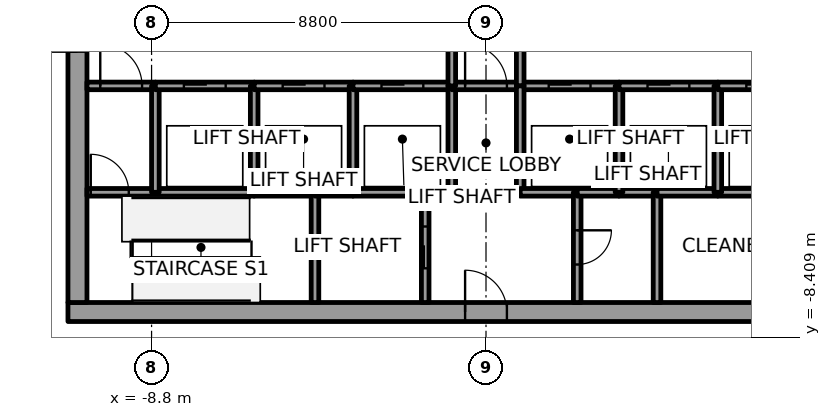
"""IFC4 building model, lengths in metres.
Left out: names, types, materials, properties, quantities, classifications, styles, units other than length and angle.
Written with IfcOpenShell. Run it as: python <this file> out.ifc"""

import sys

from ifc_helpers import new_model, si_unit, direction, frame, frame_2d, origin, place, context, subcontext, project, spatial, rectangle, extrude, element, fill, save


model = new_model("IFC4")
c1 = context("Model", 3, precision=1e-05, world=origin(), true_north=direction((0.0, 1.0)))
c2 = subcontext(c1, "Body", "Model", "MODEL_VIEW")
j1 = project(units=[si_unit("LENGTHUNIT", "METRE"), si_unit("PLANEANGLEUNIT", "RADIAN")], contexts=[c1])
p1 = place(None, origin())
s1 = spatial("IfcSite", under=j1, at=p1, CompositionType="ELEMENT")
p2 = place(p1, origin())
s2 = spatial("IfcBuilding", under=s1, at=p2, CompositionType="ELEMENT")
p3 = place(p2, frame((0.0, 0.0, 129.8)))
s3 = spatial("IfcBuildingStorey", under=s2, at=p3, CompositionType="ELEMENT", Elevation=129.8)
p4 = place(p3, frame((-11.0, -7.75, 0.0), z_axis=(0.0, 0.0, 1.0), x_axis=(1.0, 0.0, 0.0)))
e1 = element("IfcWall", 1, at=p4, inside=s3, PredefinedType="SHEAR", context=c2, shape_type="SweptSolid", body=[
    extrude(rectangle(XDim=22.0, YDim=0.5, at=frame_2d((11.0, 0.0))), origin(), (0.0, 0.0, 1.0), 4.0),
])
p5 = place(p4, frame((10.45, 0.0, 0.0)))
e2 = element("IfcOpeningElement", 2, at=p5, cuts=e1, PredefinedType="OPENING", context=c2, shape_type="SweptSolid", body=[
    extrude(rectangle(XDim=1.1, YDim=2.1, at=frame_2d((0.55, 1.05))), frame((0.0, 0.25, 0.0), z_axis=(0.0, -1.0, 0.0), x_axis=(1.0, 0.0, 0.0)), (0.0, 0.0, 1.0), 0.5),
])
p6 = place(p3, frame((-10.75, -7.5, 0.0), z_axis=(0.0, 0.0, 1.0), x_axis=(0.0, 1.0, 0.0)))
e3 = element("IfcWall", 3, at=p6, inside=s3, PredefinedType="SHEAR", context=c2, shape_type="SweptSolid", body=[
    extrude(rectangle(XDim=15.0, YDim=0.5, at=frame_2d((7.5, 0.0))), origin(), (0.0, 0.0, 1.0), 4.0),
])
p7 = place(p6, frame((6.6, 0.0, 0.0)))
e4 = element("IfcOpeningElement", 4, at=p7, cuts=e3, PredefinedType="OPENING", context=c2, shape_type="SweptSolid", body=[
    extrude(rectangle(XDim=1.8, YDim=2.1, at=frame_2d((0.9, 1.05))), frame((0.0, 0.25, 0.0), z_axis=(0.0, -1.0, 0.0), x_axis=(1.0, 0.0, 0.0)), (0.0, 0.0, 1.0), 0.5),
])
p8 = place(p3, frame((-10.5, -4.6, 0.0), z_axis=(0.0, 0.0, 1.0), x_axis=(1.0, 0.0, 0.0)))
e5 = element("IfcWall", 5, at=p8, inside=s3, PredefinedType="SOLIDWALL", context=c2, shape_type="SweptSolid", body=[
    extrude(rectangle(XDim=1.8, YDim=0.2, at=frame_2d((0.9, 0.0))), origin(), (0.0, 0.0, 1.0), 3.85),
])
p9 = place(p8, frame((0.1, 0.0, 0.0)))
e6 = element("IfcOpeningElement", 6, at=p9, cuts=e5, PredefinedType="OPENING", context=c2, shape_type="SweptSolid", body=[
    extrude(rectangle(XDim=1.0, YDim=2.1, at=frame_2d((0.5, 1.05))), frame((0.0, 0.1, 0.0), z_axis=(0.0, -1.0, 0.0), x_axis=(1.0, 0.0, 0.0)), (0.0, 0.0, 1.0), 0.2),
])
p10 = place(p3, frame((-10.5, -1.8, 0.0), z_axis=(0.0, 0.0, 1.0), x_axis=(1.0, 0.0, 0.0)))
e7 = element("IfcWall", 7, at=p10, inside=s3, PredefinedType="SOLIDWALL", context=c2, shape_type="SweptSolid", body=[
    extrude(rectangle(XDim=1.8, YDim=0.2, at=frame_2d((0.9, 0.0))), origin(), (0.0, 0.0, 1.0), 3.85),
])
p11 = place(p10, frame((0.35, 0.0, 0.0)))
e8 = element("IfcOpeningElement", 8, at=p11, cuts=e7, PredefinedType="OPENING", context=c2, shape_type="SweptSolid", body=[
    extrude(rectangle(XDim=1.1, YDim=2.1, at=frame_2d((0.55, 1.05))), frame((0.0, 0.1, 0.0), z_axis=(0.0, -1.0, 0.0), x_axis=(1.0, 0.0, 0.0)), (0.0, 0.0, 1.0), 0.2),
])
p12 = place(p3, frame((-8.7, -4.6, 0.0), z_axis=(0.0, 0.0, 1.0), x_axis=(1.0, 0.0, 0.0)))
e9 = element("IfcWall", 9, at=p12, inside=s3, PredefinedType="SOLIDWALL", context=c2, shape_type="SweptSolid", body=[
    extrude(rectangle(XDim=2.6, YDim=0.2, at=frame_2d((1.3, 0.0))), origin(), (0.0, 0.0, 1.0), 3.85),
])
p13 = place(p3, frame((-8.7, -4.6, 0.0), z_axis=(0.0, 0.0, 1.0), x_axis=(0.0, 1.0, 0.0)))
e10 = element("IfcWall", 10, at=p13, inside=s3, PredefinedType="SOLIDWALL", context=c2, shape_type="SweptSolid", body=[
    extrude(rectangle(XDim=2.8, YDim=0.2, at=frame_2d((1.4, 0.0))), origin(), (0.0, 0.0, 1.0), 3.85),
])
p14 = place(p3, frame((-8.7, -1.8, 0.0), z_axis=(0.0, 0.0, 1.0), x_axis=(1.0, 0.0, 0.0)))
e11 = element("IfcWall", 11, at=p14, inside=s3, PredefinedType="SOLIDWALL", context=c2, shape_type="SweptSolid", body=[
    extrude(rectangle(XDim=2.6, YDim=0.2, at=frame_2d((1.3, 0.0))), origin(), (0.0, 0.0, 1.0), 3.85),
])
p15 = place(p14, frame((0.75, 0.0, 0.0)))
e12 = element("IfcOpeningElement", 12, at=p15, cuts=e11, PredefinedType="OPENING", context=c2, shape_type="SweptSolid", body=[
    extrude(rectangle(XDim=1.1, YDim=2.1, at=frame_2d((0.55, 1.05))), frame((0.0, 0.1, 0.0), z_axis=(0.0, -1.0, 0.0), x_axis=(1.0, 0.0, 0.0)), (0.0, 0.0, 1.0), 0.2),
])
p16 = place(p3, frame((-6.1, -4.6, 0.0), z_axis=(0.0, 0.0, 1.0), x_axis=(1.0, 0.0, 0.0)))
e13 = element("IfcWall", 13, at=p16, inside=s3, PredefinedType="SOLIDWALL", context=c2, shape_type="SweptSolid", body=[
    extrude(rectangle(XDim=1.6, YDim=0.2, at=frame_2d((0.8, 0.0))), origin(), (0.0, 0.0, 1.0), 3.85),
])
p17 = place(p3, frame((-6.1, -4.6, 0.0), z_axis=(0.0, 0.0, 1.0), x_axis=(0.0, 1.0, 0.0)))
e14 = element("IfcWall", 14, at=p17, inside=s3, PredefinedType="SOLIDWALL", context=c2, shape_type="SweptSolid", body=[
    extrude(rectangle(XDim=2.8, YDim=0.2, at=frame_2d((1.4, 0.0))), origin(), (0.0, 0.0, 1.0), 3.85),
])
p18 = place(p3, frame((-6.1, -1.8, 0.0), z_axis=(0.0, 0.0, 1.0), x_axis=(1.0, 0.0, 0.0)))
e15 = element("IfcWall", 15, at=p18, inside=s3, PredefinedType="SOLIDWALL", context=c2, shape_type="SweptSolid", body=[
    extrude(rectangle(XDim=2.6, YDim=0.2, at=frame_2d((1.3, 0.0))), origin(), (0.0, 0.0, 1.0), 3.85),
])
p19 = place(p18, frame((0.75, 0.0, 0.0)))
e16 = element("IfcOpeningElement", 16, at=p19, cuts=e15, PredefinedType="OPENING", context=c2, shape_type="SweptSolid", body=[
    extrude(rectangle(XDim=1.1, YDim=2.1, at=frame_2d((0.55, 1.05))), frame((0.0, 0.1, 0.0), z_axis=(0.0, -1.0, 0.0), x_axis=(1.0, 0.0, 0.0)), (0.0, 0.0, 1.0), 0.2),
])
p20 = place(p3, frame((-4.5, -4.6, 0.0), z_axis=(0.0, 0.0, 1.0), x_axis=(0.0, -1.0, 0.0)))
e17 = element("IfcWall", 17, at=p20, inside=s3, PredefinedType="SOLIDWALL", context=c2, shape_type="SweptSolid", body=[
    extrude(rectangle(XDim=2.9, YDim=0.2, at=frame_2d((1.45, 0.0))), origin(), (0.0, 0.0, 1.0), 3.85),
])
p21 = place(p3, frame((-4.5, -4.6, 0.0), z_axis=(0.0, 0.0, 1.0), x_axis=(1.0, 0.0, 0.0)))
e18 = element("IfcWall", 18, at=p21, inside=s3, PredefinedType="SOLIDWALL", context=c2, shape_type="SweptSolid", body=[
    extrude(rectangle(XDim=1.0, YDim=0.2, at=frame_2d((0.5, 0.0))), origin(), (0.0, 0.0, 1.0), 3.85),
])
p22 = place(p3, frame((-3.5, -4.6, 0.0), z_axis=(0.0, 0.0, 1.0), x_axis=(1.0, 0.0, 0.0)))
e19 = element("IfcWall", 19, at=p22, inside=s3, PredefinedType="SOLIDWALL", context=c2, shape_type="SweptSolid", body=[
    extrude(rectangle(XDim=1.9, YDim=0.2, at=frame_2d((0.95, 0.0))), origin(), (0.0, 0.0, 1.0), 3.85),
])
p23 = place(p3, frame((-3.5, -4.6, 0.0), z_axis=(0.0, 0.0, 1.0), x_axis=(0.0, 1.0, 0.0)))
e20 = element("IfcWall", 20, at=p23, inside=s3, PredefinedType="SOLIDWALL", context=c2, shape_type="SweptSolid", body=[
    extrude(rectangle(XDim=2.8, YDim=0.2, at=frame_2d((1.4, 0.0))), origin(), (0.0, 0.0, 1.0), 3.85),
])
p24 = place(p3, frame((-3.5, -1.8, 0.0), z_axis=(0.0, 0.0, 1.0), x_axis=(1.0, 0.0, 0.0)))
e21 = element("IfcWall", 21, at=p24, inside=s3, PredefinedType="SOLIDWALL", context=c2, shape_type="SweptSolid", body=[
    extrude(rectangle(XDim=2.6, YDim=0.2, at=frame_2d((1.3, 0.0))), origin(), (0.0, 0.0, 1.0), 3.85),
])
p25 = place(p24, frame((0.75, 0.0, 0.0)))
e22 = element("IfcOpeningElement", 22, at=p25, cuts=e21, PredefinedType="OPENING", context=c2, shape_type="SweptSolid", body=[
    extrude(rectangle(XDim=1.1, YDim=2.1, at=frame_2d((0.55, 1.05))), frame((0.0, 0.1, 0.0), z_axis=(0.0, -1.0, 0.0), x_axis=(1.0, 0.0, 0.0)), (0.0, 0.0, 1.0), 0.2),
])
p26 = place(p3, frame((-1.6, -7.5, 0.0), z_axis=(0.0, 0.0, 1.0), x_axis=(0.0, 1.0, 0.0)))
e23 = element("IfcWall", 23, at=p26, inside=s3, PredefinedType="SOLIDWALL", context=c2, shape_type="SweptSolid", body=[
    extrude(rectangle(XDim=2.9, YDim=0.2, at=frame_2d((1.45, 0.0))), origin(), (0.0, 0.0, 1.0), 3.85),
])
p27 = place(p26, frame((0.9, 0.0, 0.0)))
e24 = element("IfcOpeningElement", 24, at=p27, cuts=e23, PredefinedType="OPENING", context=c2, shape_type="SweptSolid", body=[
    extrude(rectangle(XDim=1.1, YDim=2.1, at=frame_2d((0.55, 1.05))), frame((0.0, 0.1, 0.0), z_axis=(0.0, -1.0, 0.0), x_axis=(1.0, 0.0, 0.0)), (0.0, 0.0, 1.0), 0.2),
])
p28 = place(p3, frame((-1.6, -4.6, 0.0), z_axis=(0.0, 0.0, 1.0), x_axis=(1.0, 0.0, 0.0)))
e25 = element("IfcWall", 25, at=p28, inside=s3, PredefinedType="SOLIDWALL", context=c2, shape_type="SweptSolid", body=[
    extrude(rectangle(XDim=0.7, YDim=0.2, at=frame_2d((0.35, 0.0))), origin(), (0.0, 0.0, 1.0), 3.85),
])
p29 = place(p3, frame((-0.9, -4.6, 0.0), z_axis=(0.0, 0.0, 1.0), x_axis=(0.0, 1.0, 0.0)))
e26 = element("IfcWall", 26, at=p29, inside=s3, PredefinedType="SOLIDWALL", context=c2, shape_type="SweptSolid", body=[
    extrude(rectangle(XDim=2.8, YDim=0.2, at=frame_2d((1.4, 0.0))), origin(), (0.0, 0.0, 1.0), 3.85),
])
p30 = place(p3, frame((-0.9, -1.8, 0.0), z_axis=(0.0, 0.0, 1.0), x_axis=(1.0, 0.0, 0.0)))
e27 = element("IfcWall", 27, at=p30, inside=s3, PredefinedType="SOLIDWALL", context=c2, shape_type="SweptSolid", body=[
    extrude(rectangle(XDim=1.8, YDim=0.2, at=frame_2d((0.9, 0.0))), origin(), (0.0, 0.0, 1.0), 3.85),
])
p31 = place(p30, frame((0.35, 0.0, 0.0)))
e28 = element("IfcOpeningElement", 28, at=p31, cuts=e27, PredefinedType="OPENING", context=c2, shape_type="SweptSolid", body=[
    extrude(rectangle(XDim=1.1, YDim=2.1, at=frame_2d((0.55, 1.05))), frame((0.0, 0.1, 0.0), z_axis=(0.0, -1.0, 0.0), x_axis=(1.0, 0.0, 0.0)), (0.0, 0.0, 1.0), 0.2),
])
p32 = place(p3, frame((-0.9, 1.8, 0.0), z_axis=(0.0, 0.0, 1.0), x_axis=(0.0, -1.0, 0.0)))
e29 = element("IfcWall", 29, at=p32, inside=s3, PredefinedType="SOLIDWALL", context=c2, shape_type="SweptSolid", body=[
    extrude(rectangle(XDim=3.6, YDim=0.2, at=frame_2d((1.8, 0.0))), origin(), (0.0, 0.0, 1.0), 3.85),
])
p33 = place(p32, frame((1.05, 0.0, 0.0)))
e30 = element("IfcOpeningElement", 30, at=p33, cuts=e29, PredefinedType="OPENING", context=c2, shape_type="SweptSolid", body=[
    extrude(rectangle(XDim=1.5, YDim=2.1, at=frame_2d((0.75, 1.05))), frame((0.0, 0.1, 0.0), z_axis=(0.0, -1.0, 0.0), x_axis=(1.0, 0.0, 0.0)), (0.0, 0.0, 1.0), 0.2),
])
p34 = place(p3, frame((0.9, -1.8, 0.0), z_axis=(0.0, 0.0, 1.0), x_axis=(1.0, 0.0, 0.0)))
e31 = element("IfcWall", 31, at=p34, inside=s3, PredefinedType="SOLIDWALL", context=c2, shape_type="SweptSolid", body=[
    extrude(rectangle(XDim=2.6, YDim=0.2, at=frame_2d((1.3, 0.0))), origin(), (0.0, 0.0, 1.0), 3.85),
])
p35 = place(p34, frame((0.75, 0.0, 0.0)))
e32 = element("IfcOpeningElement", 32, at=p35, cuts=e31, PredefinedType="OPENING", context=c2, shape_type="SweptSolid", body=[
    extrude(rectangle(XDim=1.1, YDim=2.1, at=frame_2d((0.55, 1.05))), frame((0.0, 0.1, 0.0), z_axis=(0.0, -1.0, 0.0), x_axis=(1.0, 0.0, 0.0)), (0.0, 0.0, 1.0), 0.2),
])
p36 = place(p3, frame((0.9, -1.8, 0.0), z_axis=(0.0, 0.0, 1.0), x_axis=(0.0, 1.0, 0.0)))
e33 = element("IfcWall", 33, at=p36, inside=s3, PredefinedType="SOLIDWALL", context=c2, shape_type="SweptSolid", body=[
    extrude(rectangle(XDim=3.6, YDim=0.2, at=frame_2d((1.8, 0.0))), origin(), (0.0, 0.0, 1.0), 3.85),
])
p37 = place(p36, frame((1.05, 0.0, 0.0)))
e34 = element("IfcOpeningElement", 34, at=p37, cuts=e33, PredefinedType="OPENING", context=c2, shape_type="SweptSolid", body=[
    extrude(rectangle(XDim=1.5, YDim=2.1, at=frame_2d((0.75, 1.05))), frame((0.0, 0.1, 0.0), z_axis=(0.0, -1.0, 0.0), x_axis=(1.0, 0.0, 0.0)), (0.0, 0.0, 1.0), 0.2),
])
p38 = place(p3, frame((0.9, -1.8, 0.0), z_axis=(0.0, 0.0, 1.0), x_axis=(0.0, -1.0, 0.0)))
e35 = element("IfcWall", 35, at=p38, inside=s3, PredefinedType="SOLIDWALL", context=c2, shape_type="SweptSolid", body=[
    extrude(rectangle(XDim=2.8, YDim=0.2, at=frame_2d((1.4, 0.0))), origin(), (0.0, 0.0, 1.0), 3.85),
])
p39 = place(p3, frame((0.9, -4.6, 0.0), z_axis=(0.0, 0.0, 1.0), x_axis=(1.0, 0.0, 0.0)))
e36 = element("IfcWall", 36, at=p39, inside=s3, PredefinedType="SOLIDWALL", context=c2, shape_type="SweptSolid", body=[
    extrude(rectangle(XDim=1.5, YDim=0.2, at=frame_2d((0.75, 0.0))), origin(), (0.0, 0.0, 1.0), 3.85),
])
p40 = place(p3, frame((2.4, -4.6, 0.0), z_axis=(0.0, 0.0, 1.0), x_axis=(0.0, -1.0, 0.0)))
e37 = element("IfcWall", 37, at=p40, inside=s3, PredefinedType="SOLIDWALL", context=c2, shape_type="SweptSolid", body=[
    extrude(rectangle(XDim=2.9, YDim=0.2, at=frame_2d((1.45, 0.0))), origin(), (0.0, 0.0, 1.0), 3.85),
])
p41 = place(p40, frame((1.0, 0.0, 0.0)))
e38 = element("IfcOpeningElement", 38, at=p41, cuts=e37, PredefinedType="OPENING", context=c2, shape_type="SweptSolid", body=[
    extrude(rectangle(XDim=0.9, YDim=2.1, at=frame_2d((0.45, 1.05))), frame((0.0, 0.1, 0.0), z_axis=(0.0, -1.0, 0.0), x_axis=(1.0, 0.0, 0.0)), (0.0, 0.0, 1.0), 0.2),
])
p42 = place(p3, frame((3.5, -4.6, 0.0), z_axis=(0.0, 0.0, 1.0), x_axis=(-1.0, 0.0, 0.0)))
e39 = element("IfcWall", 39, at=p42, inside=s3, PredefinedType="SOLIDWALL", context=c2, shape_type="SweptSolid", body=[
    extrude(rectangle(XDim=1.1, YDim=0.2, at=frame_2d((0.55, 0.0))), origin(), (0.0, 0.0, 1.0), 3.85),
])
p43 = place(p3, frame((4.5, -4.6, 0.0), z_axis=(0.0, 0.0, 1.0), x_axis=(-1.0, 0.0, 0.0)))
e40 = element("IfcWall", 40, at=p43, inside=s3, PredefinedType="SOLIDWALL", context=c2, shape_type="SweptSolid", body=[
    extrude(rectangle(XDim=1.0, YDim=0.2, at=frame_2d((0.5, 0.0))), origin(), (0.0, 0.0, 1.0), 3.85),
])
p44 = place(p3, frame((3.5, -4.6, 0.0), z_axis=(0.0, 0.0, 1.0), x_axis=(0.0, 1.0, 0.0)))
e41 = element("IfcWall", 41, at=p44, inside=s3, PredefinedType="SOLIDWALL", context=c2, shape_type="SweptSolid", body=[
    extrude(rectangle(XDim=2.8, YDim=0.2, at=frame_2d((1.4, 0.0))), origin(), (0.0, 0.0, 1.0), 3.85),
])
p45 = place(p3, frame((3.5, -1.8, 0.0), z_axis=(0.0, 0.0, 1.0), x_axis=(1.0, 0.0, 0.0)))
e42 = element("IfcWall", 42, at=p45, inside=s3, PredefinedType="SOLIDWALL", context=c2, shape_type="SweptSolid", body=[
    extrude(rectangle(XDim=2.6, YDim=0.2, at=frame_2d((1.3, 0.0))), origin(), (0.0, 0.0, 1.0), 3.85),
])
p46 = place(p45, frame((0.75, 0.0, 0.0)))
e43 = element("IfcOpeningElement", 43, at=p46, cuts=e42, PredefinedType="OPENING", context=c2, shape_type="SweptSolid", body=[
    extrude(rectangle(XDim=1.1, YDim=2.1, at=frame_2d((0.55, 1.05))), frame((0.0, 0.1, 0.0), z_axis=(0.0, -1.0, 0.0), x_axis=(1.0, 0.0, 0.0)), (0.0, 0.0, 1.0), 0.2),
])
p47 = place(p3, frame((4.5, -4.6, 0.0), z_axis=(0.0, 0.0, 1.0), x_axis=(0.0, -1.0, 0.0)))
e44 = element("IfcWall", 44, at=p47, inside=s3, PredefinedType="SOLIDWALL", context=c2, shape_type="SweptSolid", body=[
    extrude(rectangle(XDim=2.9, YDim=0.2, at=frame_2d((1.45, 0.0))), origin(), (0.0, 0.0, 1.0), 3.85),
])
p48 = place(p3, frame((6.1, -4.6, 0.0), z_axis=(0.0, 0.0, 1.0), x_axis=(-1.0, 0.0, 0.0)))
e45 = element("IfcWall", 45, at=p48, inside=s3, PredefinedType="SOLIDWALL", context=c2, shape_type="SweptSolid", body=[
    extrude(rectangle(XDim=1.6, YDim=0.2, at=frame_2d((0.8, 0.0))), origin(), (0.0, 0.0, 1.0), 3.85),
])
p49 = place(p3, frame((8.7, -4.6, 0.0), z_axis=(0.0, 0.0, 1.0), x_axis=(-1.0, 0.0, 0.0)))
e46 = element("IfcWall", 46, at=p49, inside=s3, PredefinedType="SOLIDWALL", context=c2, shape_type="SweptSolid", body=[
    extrude(rectangle(XDim=2.6, YDim=0.2, at=frame_2d((1.3, 0.0))), origin(), (0.0, 0.0, 1.0), 3.85),
])
p50 = place(p3, frame((6.1, -4.6, 0.0), z_axis=(0.0, 0.0, 1.0), x_axis=(0.0, 1.0, 0.0)))
e47 = element("IfcWall", 47, at=p50, inside=s3, PredefinedType="SOLIDWALL", context=c2, shape_type="SweptSolid", body=[
    extrude(rectangle(XDim=2.8, YDim=0.2, at=frame_2d((1.4, 0.0))), origin(), (0.0, 0.0, 1.0), 3.85),
])
p51 = place(p3, frame((6.1, -1.8, 0.0), z_axis=(0.0, 0.0, 1.0), x_axis=(1.0, 0.0, 0.0)))
e48 = element("IfcWall", 48, at=p51, inside=s3, PredefinedType="SOLIDWALL", context=c2, shape_type="SweptSolid", body=[
    extrude(rectangle(XDim=2.6, YDim=0.2, at=frame_2d((1.3, 0.0))), origin(), (0.0, 0.0, 1.0), 3.85),
])
p52 = place(p51, frame((0.75, 0.0, 0.0)))
e49 = element("IfcOpeningElement", 49, at=p52, cuts=e48, PredefinedType="OPENING", context=c2, shape_type="SweptSolid", body=[
    extrude(rectangle(XDim=1.1, YDim=2.1, at=frame_2d((0.55, 1.05))), frame((0.0, 0.1, 0.0), z_axis=(0.0, -1.0, 0.0), x_axis=(1.0, 0.0, 0.0)), (0.0, 0.0, 1.0), 0.2),
])
p53 = place(p15, origin())
e50 = element("IfcDoor", 50, at=p53, inside=s3, OperationType="SLIDING_TO_RIGHT", PredefinedType="DOOR", context=c2, shape_type="SweptSolid", body=[
    extrude(rectangle(XDim=1.1, YDim=2.1, at=frame_2d((0.55, 1.05))), frame((0.0, 0.025, 0.0), z_axis=(0.0, -1.0, 0.0), x_axis=(1.0, 0.0, 0.0)), (0.0, 0.0, 1.0), 0.05),
])
fill(e12, e50)
p54 = place(p19, origin())
e51 = element("IfcDoor", 51, at=p54, inside=s3, OperationType="SLIDING_TO_LEFT", PredefinedType="DOOR", context=c2, shape_type="SweptSolid", body=[
    extrude(rectangle(XDim=1.1, YDim=2.1, at=frame_2d((0.55, 1.05))), frame((0.0, 0.025, 0.0), z_axis=(0.0, -1.0, 0.0), x_axis=(1.0, 0.0, 0.0)), (0.0, 0.0, 1.0), 0.05),
])
fill(e16, e51)
p55 = place(p25, origin())
e52 = element("IfcDoor", 52, at=p55, inside=s3, OperationType="SLIDING_TO_RIGHT", PredefinedType="DOOR", context=c2, shape_type="SweptSolid", body=[
    extrude(rectangle(XDim=1.1, YDim=2.1, at=frame_2d((0.55, 1.05))), frame((0.0, 0.025, 0.0), z_axis=(0.0, -1.0, 0.0), x_axis=(1.0, 0.0, 0.0)), (0.0, 0.0, 1.0), 0.05),
])
fill(e22, e52)
p56 = place(p35, origin())
e53 = element("IfcDoor", 53, at=p56, inside=s3, OperationType="SLIDING_TO_RIGHT", PredefinedType="DOOR", context=c2, shape_type="SweptSolid", body=[
    extrude(rectangle(XDim=1.1, YDim=2.1, at=frame_2d((0.55, 1.05))), frame((0.0, 0.025, 0.0), z_axis=(0.0, -1.0, 0.0), x_axis=(1.0, 0.0, 0.0)), (0.0, 0.0, 1.0), 0.05),
])
fill(e32, e53)
p57 = place(p46, origin())
e54 = element("IfcDoor", 54, at=p57, inside=s3, OperationType="SLIDING_TO_LEFT", PredefinedType="DOOR", context=c2, shape_type="SweptSolid", body=[
    extrude(rectangle(XDim=1.1, YDim=2.1, at=frame_2d((0.55, 1.05))), frame((0.0, 0.025, 0.0), z_axis=(0.0, -1.0, 0.0), x_axis=(1.0, 0.0, 0.0)), (0.0, 0.0, 1.0), 0.05),
])
fill(e43, e54)
p58 = place(p52, origin())
e55 = element("IfcDoor", 55, at=p58, inside=s3, OperationType="SLIDING_TO_LEFT", PredefinedType="DOOR", context=c2, shape_type="SweptSolid", body=[
    extrude(rectangle(XDim=1.1, YDim=2.1, at=frame_2d((0.55, 1.05))), frame((0.0, 0.025, 0.0), z_axis=(0.0, -1.0, 0.0), x_axis=(1.0, 0.0, 0.0)), (0.0, 0.0, 1.0), 0.05),
])
fill(e49, e55)
p59 = place(p27, origin())
e56 = element("IfcDoor", 56, at=p59, inside=s3, OperationType="SLIDING_TO_RIGHT", PredefinedType="DOOR", context=c2, shape_type="SweptSolid", body=[
    extrude(rectangle(XDim=1.1, YDim=2.1, at=frame_2d((0.55, 1.05))), frame((0.0, 0.025, 0.0), z_axis=(0.0, -1.0, 0.0), x_axis=(1.0, 0.0, 0.0)), (0.0, 0.0, 1.0), 0.05),
])
fill(e24, e56)
p60 = place(p11, origin())
e57 = element("IfcDoor", 57, at=p60, inside=s3, OperationType="SINGLE_SWING_LEFT", PredefinedType="DOOR", context=c2, shape_type="SweptSolid", body=[
    extrude(rectangle(XDim=1.1, YDim=2.1, at=frame_2d((0.55, 1.05))), frame((0.0, 0.025, 0.0), z_axis=(0.0, -1.0, 0.0), x_axis=(1.0, 0.0, 0.0)), (0.0, 0.0, 1.0), 0.05),
])
fill(e8, e57)
p61 = place(p31, origin())
e58 = element("IfcDoor", 58, at=p61, inside=s3, OperationType="SINGLE_SWING_RIGHT", PredefinedType="DOOR", context=c2, shape_type="SweptSolid", body=[
    extrude(rectangle(XDim=1.1, YDim=2.1, at=frame_2d((0.55, 1.05))), frame((0.0, 0.025, 0.0), z_axis=(0.0, -1.0, 0.0), x_axis=(1.0, 0.0, 0.0)), (0.0, 0.0, 1.0), 0.05),
])
fill(e28, e58)
p62 = place(p9, origin())
e59 = element("IfcDoor", 59, at=p62, inside=s3, OperationType="SINGLE_SWING_LEFT", PredefinedType="DOOR", context=c2, shape_type="SweptSolid", body=[
    extrude(rectangle(XDim=1.0, YDim=2.1, at=frame_2d((0.5, 1.05))), frame((0.0, 0.025, 0.0), z_axis=(0.0, -1.0, 0.0), x_axis=(1.0, 0.0, 0.0)), (0.0, 0.0, 1.0), 0.05),
])
fill(e6, e59)
p63 = place(p41, origin())
e60 = element("IfcDoor", 60, at=p63, inside=s3, OperationType="SINGLE_SWING_LEFT", PredefinedType="DOOR", context=c2, shape_type="SweptSolid", body=[
    extrude(rectangle(XDim=0.9, YDim=2.1, at=frame_2d((0.45, 1.05))), frame((0.0, 0.025, 0.0), z_axis=(0.0, -1.0, 0.0), x_axis=(1.0, 0.0, 0.0)), (0.0, 0.0, 1.0), 0.05),
])
fill(e38, e60)
p64 = place(p7, origin())
e61 = element("IfcDoor", 61, at=p64, inside=s3, OperationType="DOUBLE_DOOR_SINGLE_SWING", PredefinedType="DOOR", context=c2, shape_type="SweptSolid", body=[
    extrude(rectangle(XDim=1.8, YDim=2.1, at=frame_2d((0.9, 1.05))), frame((0.0, 0.025, 0.0), z_axis=(0.0, -1.0, 0.0), x_axis=(1.0, 0.0, 0.0)), (0.0, 0.0, 1.0), 0.05),
])
fill(e4, e61)
p65 = place(p5, origin())
e62 = element("IfcDoor", 62, at=p65, inside=s3, OperationType="SINGLE_SWING_RIGHT", PredefinedType="DOOR", context=c2, shape_type="SweptSolid", body=[
    extrude(rectangle(XDim=1.1, YDim=2.1, at=frame_2d((0.55, 1.05))), frame((0.0, 0.025, 0.0), z_axis=(0.0, -1.0, 0.0), x_axis=(1.0, 0.0, 0.0)), (0.0, 0.0, 1.0), 0.05),
])
fill(e2, e62)
save(model, sys.argv[1])
